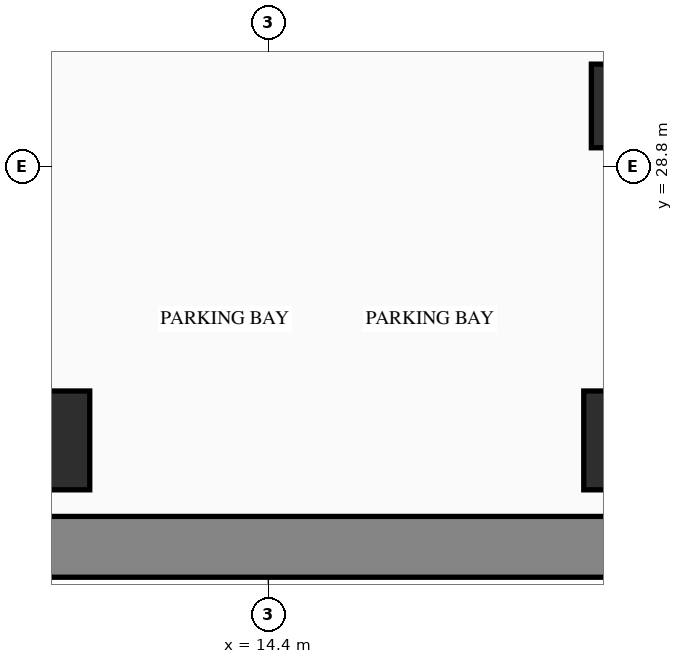
"""IFC4 building model, lengths in metres.
Left out: names, types, materials, properties, quantities, classifications, styles, units other than length and angle.
Written with IfcOpenShell. Run it as: python <this file> out.ifc"""

import sys

from ifc_helpers import new_model, si_unit, direction, frame, frame_2d, origin, origin_2d, place, context, subcontext, project, spatial, rectangle, hollow_rectangle, extrude, element, save


model = new_model("IFC4")
c1 = context("Model", 3, precision=1e-05, world=origin(), true_north=direction((0.0, 1.0)))
c2 = subcontext(c1, "Body", "Model", "MODEL_VIEW")
j1 = project(units=[si_unit("LENGTHUNIT", "METRE"), si_unit("PLANEANGLEUNIT", "RADIAN")], contexts=[c1])
p1 = place(None, origin())
s1 = spatial("IfcSite", under=j1, at=p1, CompositionType="ELEMENT")
p2 = place(p1, origin())
s2 = spatial("IfcBuilding", under=s1, at=p2, CompositionType="ELEMENT")
p3 = place(p2, frame((0.0, 0.0, -9.6)))
s3 = spatial("IfcBuildingStorey", under=s2, at=p3, CompositionType="ELEMENT", Elevation=-9.6)
p4 = place(p3, frame((25.333, 23.8, 0.0), z_axis=(0.0, 0.0, 1.0), x_axis=(-1.0, 0.0, 0.0)))
e1 = element("IfcWall", 1, at=p4, inside=s3, PredefinedType="SHEAR", context=c2, shape_type="SweptSolid", body=[
    extrude(rectangle(XDim=22.767, YDim=0.8, at=frame_2d((11.384, 0.0))), origin(), (0.0, 0.0, 1.0), 4.5),
])
for number, where, z_axis, x_axis in (
    (2, (11.4, 25.2, 0.0), (0.0, 0.0, 1.0), (1.0, 0.0, 0.0)),
    (3, (19.2, 25.2, 0.0), (0.0, 0.0, 1.0), (1.0, 0.0, 0.0)),
):
    element("IfcColumn", number, at=place(p3, frame(where, z_axis=z_axis, x_axis=x_axis)), inside=s3, PredefinedType="COLUMN", context=c2, shape_type="SweptSolid", body=[
        extrude(rectangle(XDim=1.3, YDim=1.3, at=origin_2d()), origin(), (0.0, 0.0, 1.0), 4.8),
    ])
p5 = place(p3, frame((19.2, 29.6, 0.0), z_axis=(0.0, 0.0, 1.0), x_axis=(1.0, 0.0, 0.0)))
e4 = element("IfcColumn", 4, at=p5, inside=s3, PredefinedType="COLUMN", context=c2, shape_type="SweptSolid", body=[
    extrude(hollow_rectangle(XDim=1.1, YDim=1.1, WallThickness=0.04, at=origin_2d()), origin(), (0.0, 0.0, 1.0), 4.8),
])
save(model, sys.argv[1])
